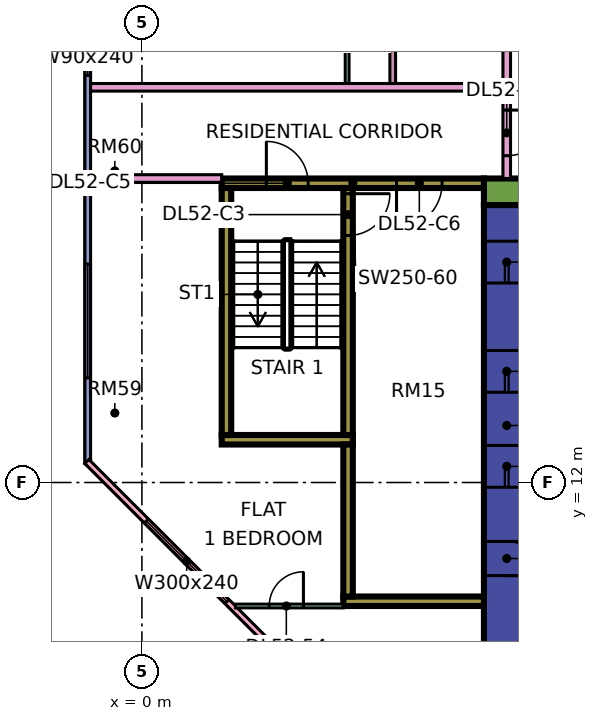
"""IFC4 building model, lengths in metres.
Left out: names, types, materials, properties, quantities, classifications, styles, units other than length and angle.
Written with IfcOpenShell. Run it as: python <this file> out.ifc"""

import sys

from ifc_helpers import new_model, si_unit, direction, frame, frame_2d, origin, place, context, subcontext, project, spatial, rectangle, extrude, element, fill, save


model = new_model("IFC4")
c1 = context("Model", 3, precision=1e-05, world=origin(), true_north=direction((0.0, 1.0)))
c2 = subcontext(c1, "Body", "Model", "MODEL_VIEW")
j1 = project(units=[si_unit("LENGTHUNIT", "METRE"), si_unit("PLANEANGLEUNIT", "RADIAN")], contexts=[c1])
p1 = place(None, origin())
s1 = spatial("IfcSite", under=j1, at=p1, CompositionType="ELEMENT")
p2 = place(p1, origin())
s2 = spatial("IfcBuilding", under=s1, at=p2, CompositionType="ELEMENT")
p3 = place(p2, frame((0.0, 0.0, 222.9)))
s3 = spatial("IfcBuildingStorey", under=s2, at=p3, CompositionType="ELEMENT", Elevation=222.9)
p4 = place(p3, frame((9.0, 19.65, 0.0), z_axis=(0.0, 0.0, 1.0), x_axis=(1.0, 0.0, 0.0)))
e1 = element("IfcWall", 1, at=p4, inside=s3, PredefinedType="SHEAR", context=c2, shape_type="SweptSolid", body=[
    extrude(rectangle(XDim=25.0, YDim=0.7, at=frame_2d((12.5, 0.0))), origin(), (0.0, 0.0, 1.0), 3.75),
])
p5 = place(p4, frame((19.1, 0.0, 0.0)))
e2 = element("IfcOpeningElement", 2, at=p5, cuts=e1, PredefinedType="OPENING", context=c2, shape_type="SweptSolid", body=[
    extrude(rectangle(XDim=1.8, YDim=2.4, at=frame_2d((0.9, 1.2))), frame((0.0, 0.36, 0.0), z_axis=(0.0, -1.0, 0.0), x_axis=(1.0, 0.0, 0.0)), (0.0, 0.0, 1.0), 0.72),
])
p6 = place(p3, frame((9.6, 7.7, 0.0), z_axis=(0.0, 0.0, 1.0), x_axis=(0.0, 1.0, 0.0)))
e3 = element("IfcWall", 3, at=p6, inside=s3, PredefinedType="SHEAR", context=c2, shape_type="SweptSolid", body=[
    extrude(rectangle(XDim=11.6, YDim=1.2, at=frame_2d((5.8, 0.0))), origin(), (0.0, 0.0, 1.0), 3.75),
])
p7 = place(p6, frame((4.175, 0.0, 0.0)))
e4 = element("IfcOpeningElement", 4, at=p7, cuts=e3, PredefinedType="OPENING", context=c2, shape_type="SweptSolid", body=[
    extrude(rectangle(XDim=1.1, YDim=2.2, at=frame_2d((0.55, 1.1))), frame((0.0, 0.61, 0.0), z_axis=(0.0, -1.0, 0.0), x_axis=(1.0, 0.0, 0.0)), (0.0, 0.0, 1.0), 1.22),
])
p8 = place(p6, frame((6.675, 0.0, 0.0)))
e5 = element("IfcOpeningElement", 5, at=p8, cuts=e3, PredefinedType="OPENING", context=c2, shape_type="SweptSolid", body=[
    extrude(rectangle(XDim=1.1, YDim=2.2, at=frame_2d((0.55, 1.1))), frame((0.0, 0.61, 0.0), z_axis=(0.0, -1.0, 0.0), x_axis=(1.0, 0.0, 0.0)), (0.0, 0.0, 1.0), 1.22),
])
p9 = place(p6, frame((9.55, 0.0, 0.0)))
e6 = element("IfcOpeningElement", 6, at=p9, cuts=e3, PredefinedType="OPENING", context=c2, shape_type="SweptSolid", body=[
    extrude(rectangle(XDim=1.1, YDim=2.2, at=frame_2d((0.55, 1.1))), frame((0.0, 0.61, 0.0), z_axis=(0.0, -1.0, 0.0), x_axis=(1.0, 0.0, 0.0)), (0.0, 0.0, 1.0), 1.22),
])
p10 = place(p6, frame((1.85, 0.0, 0.0)))
e7 = element("IfcOpeningElement", 7, at=p10, cuts=e3, PredefinedType="OPENING", context=c2, shape_type="SweptSolid", body=[
    extrude(rectangle(XDim=0.9, YDim=2.1, at=frame_2d((0.45, 1.05))), frame((0.0, 0.61, 0.0), z_axis=(0.0, -1.0, 0.0), x_axis=(1.0, 0.0, 0.0)), (0.0, 0.0, 1.0), 1.22),
])
p11 = place(p3, frame((2.1, 19.875, 0.0), z_axis=(0.0, 0.0, 1.0), x_axis=(1.0, 0.0, 0.0)))
e8 = element("IfcWall", 8, at=p11, inside=s3, PredefinedType="SHEAR", context=c2, shape_type="SweptSolid", body=[
    extrude(rectangle(XDim=6.9, YDim=0.25, at=frame_2d((3.45, 0.0))), origin(), (0.0, 0.0, 1.0), 3.75),
])
p12 = place(p11, frame((1.175, 0.0, 0.0)))
e9 = element("IfcOpeningElement", 9, at=p12, cuts=e8, PredefinedType="OPENING", context=c2, shape_type="SweptSolid", body=[
    extrude(rectangle(XDim=1.1, YDim=2.2, at=frame_2d((0.55, 1.1))), frame((0.0, 0.135, 0.0), z_axis=(0.0, -1.0, 0.0), x_axis=(1.0, 0.0, 0.0)), (0.0, 0.0, 1.0), 0.27),
])
p13 = place(p11, frame((4.6, 0.0, 0.0)))
e10 = element("IfcOpeningElement", 10, at=p13, cuts=e8, PredefinedType="OPENING", context=c2, shape_type="SweptSolid", body=[
    extrude(rectangle(XDim=1.2, YDim=2.2, at=frame_2d((0.6, 1.1))), frame((0.0, 0.135, 0.0), z_axis=(0.0, -1.0, 0.0), x_axis=(1.0, 0.0, 0.0)), (0.0, 0.0, 1.0), 0.27),
])
p14 = place(p3, frame((2.1, 13.125, 0.0), z_axis=(0.0, 0.0, 1.0), x_axis=(1.0, 0.0, 0.0)))
e11 = element("IfcWall", 11, at=p14, inside=s3, PredefinedType="SHEAR", context=c2, shape_type="SweptSolid", body=[
    extrude(rectangle(XDim=3.45, YDim=0.25, at=frame_2d((1.725, 0.0))), origin(), (0.0, 0.0, 1.0), 3.75),
])
p15 = place(p3, frame((2.225, 13.25, 0.0), z_axis=(0.0, 0.0, 1.0), x_axis=(0.0, 1.0, 0.0)))
e12 = element("IfcWall", 12, at=p15, inside=s3, PredefinedType="SHEAR", context=c2, shape_type="SweptSolid", body=[
    extrude(rectangle(XDim=6.5, YDim=0.25, at=frame_2d((3.25, 0.0))), origin(), (0.0, 0.0, 1.0), 3.75),
])
p16 = place(p3, frame((5.425, 13.25, 0.0), z_axis=(0.0, 0.0, 1.0), x_axis=(0.0, 1.0, 0.0)))
e13 = element("IfcWall", 13, at=p16, inside=s3, PredefinedType="SHEAR", context=c2, shape_type="SweptSolid", body=[
    extrude(rectangle(XDim=6.5, YDim=0.25, at=frame_2d((3.25, 0.0))), origin(), (0.0, 0.0, 1.0), 3.75),
])
p17 = place(p16, frame((5.25, 0.0, 0.0)))
e14 = element("IfcOpeningElement", 14, at=p17, cuts=e13, PredefinedType="OPENING", context=c2, shape_type="SweptSolid", body=[
    extrude(rectangle(XDim=1.1, YDim=2.2, at=frame_2d((0.55, 1.1))), frame((0.0, 0.135, 0.0), z_axis=(0.0, -1.0, 0.0), x_axis=(1.0, 0.0, 0.0)), (0.0, 0.0, 1.0), 0.27),
])
p18 = place(p3, frame((5.3, 8.875, 0.0), z_axis=(0.0, 0.0, 1.0), x_axis=(1.0, 0.0, 0.0)))
e15 = element("IfcWall", 15, at=p18, inside=s3, PredefinedType="SHEAR", context=c2, shape_type="SweptSolid", body=[
    extrude(rectangle(XDim=3.7, YDim=0.25, at=frame_2d((1.85, 0.0))), origin(), (0.0, 0.0, 1.0), 3.75),
])
p19 = place(p3, frame((5.425, 9.0, 0.0), z_axis=(0.0, 0.0, 1.0), x_axis=(0.0, 1.0, 0.0)))
e16 = element("IfcWall", 16, at=p19, inside=s3, PredefinedType="SHEAR", context=c2, shape_type="SweptSolid", body=[
    extrude(rectangle(XDim=4.0, YDim=0.25, at=frame_2d((2.0, 0.0))), origin(), (0.0, 0.0, 1.0), 3.75),
])
p20 = place(p3, frame((-1.425, 23.925, 0.0), z_axis=(0.0, 0.0, 1.0), x_axis=(0.0, -1.0, 0.0)))
e17 = element("IfcWall", 17, at=p20, inside=s3, PredefinedType="SOLIDWALL", context=c2, shape_type="SweptSolid", body=[
    extrude(rectangle(XDim=11.425, YDim=0.15, at=frame_2d((5.712, 0.0))), origin(), (0.0, 0.0, 1.0), 3.35),
])
p21 = place(p20, frame((0.312, 0.0, 0.45)))
e18 = element("IfcOpeningElement", 18, at=p21, cuts=e17, PredefinedType="OPENING", context=c2, shape_type="SweptSolid", body=[
    extrude(rectangle(XDim=0.9, YDim=2.4, at=frame_2d((0.45, 1.2))), frame((0.0, 0.085, 0.0), z_axis=(0.0, -1.0, 0.0), x_axis=(1.0, 0.0, 0.0)), (0.0, 0.0, 1.0), 0.17),
])
p22 = place(p20, frame((6.175, 0.0, 0.45)))
e19 = element("IfcOpeningElement", 19, at=p22, cuts=e17, PredefinedType="OPENING", context=c2, shape_type="SweptSolid", body=[
    extrude(rectangle(XDim=3.0, YDim=2.4, at=frame_2d((1.5, 1.2))), frame((0.0, 0.085, 0.0), z_axis=(0.0, -1.0, 0.0), x_axis=(1.0, 0.0, 0.0)), (0.0, 0.0, 1.0), 0.17),
])
p23 = place(p3, frame((-1.447, 12.553, 0.0), z_axis=(0.0, 0.0, 1.0), x_axis=(0.707106781187, -0.707106781187, 0.0)))
e20 = element("IfcWall", 20, at=p23, inside=s3, PredefinedType="SOLIDWALL", context=c2, shape_type="SweptSolid", body=[
    extrude(rectangle(XDim=19.799, YDim=0.15, at=frame_2d((9.899, 0.0))), origin(), (0.0, 0.0, 1.0), 3.35),
])
p24 = place(p23, frame((2.212, 0.0, 0.45)))
e21 = element("IfcOpeningElement", 21, at=p24, cuts=e20, PredefinedType="OPENING", context=c2, shape_type="SweptSolid", body=[
    extrude(rectangle(XDim=3.0, YDim=2.4, at=frame_2d((1.5, 1.2))), frame((0.0, 0.085, 0.0), z_axis=(0.0, -1.0, 0.0), x_axis=(1.0, 0.0, 0.0)), (0.0, 0.0, 1.0), 0.17),
])
p25 = place(p23, frame((10.216, 0.0, 0.45)))
e22 = element("IfcOpeningElement", 22, at=p25, cuts=e20, PredefinedType="OPENING", context=c2, shape_type="SweptSolid", body=[
    extrude(rectangle(XDim=3.0, YDim=2.4, at=frame_2d((1.5, 1.2))), frame((0.0, 0.085, 0.0), z_axis=(0.0, -1.0, 0.0), x_axis=(1.0, 0.0, 0.0)), (0.0, 0.0, 1.0), 0.17),
])
p26 = place(p3, frame((-1.35, 20.0, 0.0), z_axis=(0.0, 0.0, 1.0), x_axis=(1.0, 0.0, 0.0)))
e23 = element("IfcWall", 23, at=p26, inside=s3, PredefinedType="PARTITIONING", context=c2, shape_type="SweptSolid", body=[
    extrude(rectangle(XDim=3.45, YDim=0.2, at=frame_2d((1.725, 0.0))), origin(), (0.0, 0.0, 1.0), 3.35),
])
p27 = place(p3, frame((-1.35, 22.4, 0.0), z_axis=(0.0, 0.0, 1.0), x_axis=(1.0, 0.0, 0.0)))
e24 = element("IfcWall", 24, at=p27, inside=s3, PredefinedType="PARTITIONING", context=c2, shape_type="SweptSolid", body=[
    extrude(rectangle(XDim=10.85, YDim=0.2, at=frame_2d((5.425, 0.0))), origin(), (0.0, 0.0, 1.0), 3.35),
])
p28 = place(p3, frame((2.461, 8.75, 0.0), z_axis=(0.0, 0.0, 1.0), x_axis=(1.0, 0.0, 0.0)))
e25 = element("IfcWall", 25, at=p28, inside=s3, PredefinedType="PARTITIONING", context=c2, shape_type="SweptSolid", body=[
    extrude(rectangle(XDim=2.839, YDim=0.1, at=frame_2d((1.419, 0.0))), origin(), (0.0, 0.0, 1.0), 3.35),
])
p29 = place(p28, frame((0.889, 0.0, 0.0)))
e26 = element("IfcOpeningElement", 26, at=p29, cuts=e25, PredefinedType="OPENING", context=c2, shape_type="SweptSolid", body=[
    extrude(rectangle(XDim=0.9, YDim=2.1, at=frame_2d((0.45, 1.05))), frame((0.0, 0.06, 0.0), z_axis=(0.0, -1.0, 0.0), x_axis=(1.0, 0.0, 0.0)), (0.0, 0.0, 1.0), 0.12),
])
p30 = place(p3, frame((5.4, 22.5, 0.0), z_axis=(0.0, 0.0, 1.0), x_axis=(0.0, 1.0, 0.0)))
e27 = element("IfcWall", 27, at=p30, inside=s3, PredefinedType="PARTITIONING", context=c2, shape_type="SweptSolid", body=[
    extrude(rectangle(XDim=7.55, YDim=0.1, at=frame_2d((3.775, 0.0))), origin(), (0.0, 0.0, 1.0), 3.35),
])
p31 = place(p30, frame((1.8, 0.0, 0.0)))
e28 = element("IfcOpeningElement", 28, at=p31, cuts=e27, PredefinedType="OPENING", context=c2, shape_type="SweptSolid", body=[
    extrude(rectangle(XDim=0.9, YDim=2.1, at=frame_2d((0.45, 1.05))), frame((0.0, 0.06, 0.0), z_axis=(0.0, -1.0, 0.0), x_axis=(1.0, 0.0, 0.0)), (0.0, 0.0, 1.0), 0.12),
])
p32 = place(p30, frame((5.55, 0.0, 0.0)))
e29 = element("IfcOpeningElement", 29, at=p32, cuts=e27, PredefinedType="OPENING", context=c2, shape_type="SweptSolid", body=[
    extrude(rectangle(XDim=0.9, YDim=2.1, at=frame_2d((0.45, 1.05))), frame((0.0, 0.06, 0.0), z_axis=(0.0, -1.0, 0.0), x_axis=(1.0, 0.0, 0.0)), (0.0, 0.0, 1.0), 0.12),
])
p33 = place(p3, frame((6.6, 22.5, 0.0), z_axis=(0.0, 0.0, 1.0), x_axis=(0.0, 1.0, 0.0)))
e30 = element("IfcWall", 30, at=p33, inside=s3, PredefinedType="PARTITIONING", context=c2, shape_type="SweptSolid", body=[
    extrude(rectangle(XDim=10.875, YDim=0.15, at=frame_2d((5.438, 0.0))), origin(), (0.0, 0.0, 1.0), 3.35),
])
p34 = place(p33, frame((8.4, 0.0, 0.0)))
e31 = element("IfcOpeningElement", 31, at=p34, cuts=e30, PredefinedType="OPENING", context=c2, shape_type="SweptSolid", body=[
    extrude(rectangle(XDim=0.8, YDim=2.1, at=frame_2d((0.4, 1.05))), frame((0.0, 0.085, 0.0), z_axis=(0.0, -1.0, 0.0), x_axis=(1.0, 0.0, 0.0)), (0.0, 0.0, 1.0), 0.17),
])
p35 = place(p33, frame((2.9, 0.0, 0.0)))
e32 = element("IfcOpeningElement", 32, at=p35, cuts=e30, PredefinedType="OPENING", context=c2, shape_type="SweptSolid", body=[
    extrude(rectangle(XDim=0.9, YDim=2.1, at=frame_2d((0.45, 1.05))), frame((0.0, 0.085, 0.0), z_axis=(0.0, -1.0, 0.0), x_axis=(1.0, 0.0, 0.0)), (0.0, 0.0, 1.0), 0.17),
])
p36 = place(p3, frame((9.6, 20.0, 0.0), z_axis=(0.0, 0.0, 1.0), x_axis=(0.0, 1.0, 0.0)))
e33 = element("IfcWall", 33, at=p36, inside=s3, PredefinedType="PARTITIONING", context=c2, shape_type="SweptSolid", body=[
    extrude(rectangle(XDim=42.926, YDim=0.2, at=frame_2d((21.463, 0.0))), origin(), (0.0, 0.0, 1.0), 3.35),
])
p37 = place(p36, frame((17.1, 0.0, 0.0)))
e34 = element("IfcOpeningElement", 34, at=p37, cuts=e33, PredefinedType="OPENING", context=c2, shape_type="SweptSolid", body=[
    extrude(rectangle(XDim=1.0, YDim=2.1, at=frame_2d((0.5, 1.05))), frame((0.0, 0.11, 0.0), z_axis=(0.0, -1.0, 0.0), x_axis=(1.0, 0.0, 0.0)), (0.0, 0.0, 1.0), 0.22),
])
p38 = place(p36, frame((32.1, 0.0, 0.0)))
e35 = element("IfcOpeningElement", 35, at=p38, cuts=e33, PredefinedType="OPENING", context=c2, shape_type="SweptSolid", body=[
    extrude(rectangle(XDim=1.0, YDim=2.1, at=frame_2d((0.5, 1.05))), frame((0.0, 0.11, 0.0), z_axis=(0.0, -1.0, 0.0), x_axis=(1.0, 0.0, 0.0)), (0.0, 0.0, 1.0), 0.22),
])
p39 = place(p36, frame((0.6, 0.0, 0.0)))
e36 = element("IfcOpeningElement", 36, at=p39, cuts=e33, PredefinedType="OPENING", context=c2, shape_type="SweptSolid", body=[
    extrude(rectangle(XDim=1.2, YDim=2.1, at=frame_2d((0.6, 1.05))), frame((0.0, 0.11, 0.0), z_axis=(0.0, -1.0, 0.0), x_axis=(1.0, 0.0, 0.0)), (0.0, 0.0, 1.0), 0.22),
])
p40 = place(p36, frame((14.1, 0.0, 0.0)))
e37 = element("IfcOpeningElement", 37, at=p40, cuts=e33, PredefinedType="OPENING", context=c2, shape_type="SweptSolid", body=[
    extrude(rectangle(XDim=1.0, YDim=2.1, at=frame_2d((0.5, 1.05))), frame((0.0, 0.11, 0.0), z_axis=(0.0, -1.0, 0.0), x_axis=(1.0, 0.0, 0.0)), (0.0, 0.0, 1.0), 0.22),
])
p41 = place(p21, origin())
e38 = element("IfcWindow", 38, at=p41, inside=s3, PartitioningType="SINGLE_PANEL", PredefinedType="WINDOW", context=c2, shape_type="SweptSolid", body=[
    extrude(rectangle(XDim=0.9, YDim=2.4, at=frame_2d((0.45, 1.2))), frame((0.0, 0.03, 0.0), z_axis=(0.0, -1.0, 0.0), x_axis=(1.0, 0.0, 0.0)), (0.0, 0.0, 1.0), 0.06),
])
fill(e18, e38)
p42 = place(p22, origin())
e39 = element("IfcWindow", 39, at=p42, inside=s3, PartitioningType="SINGLE_PANEL", PredefinedType="WINDOW", context=c2, shape_type="SweptSolid", body=[
    extrude(rectangle(XDim=3.0, YDim=2.4, at=frame_2d((1.5, 1.2))), frame((0.0, 0.03, 0.0), z_axis=(0.0, -1.0, 0.0), x_axis=(1.0, 0.0, 0.0)), (0.0, 0.0, 1.0), 0.06),
])
fill(e19, e39)
p43 = place(p24, origin())
e40 = element("IfcWindow", 40, at=p43, inside=s3, PartitioningType="SINGLE_PANEL", PredefinedType="WINDOW", context=c2, shape_type="SweptSolid", body=[
    extrude(rectangle(XDim=3.0, YDim=2.4, at=frame_2d((1.5, 1.2))), frame((0.0, 0.03, 0.0), z_axis=(0.0, -1.0, 0.0), x_axis=(1.0, 0.0, 0.0)), (0.0, 0.0, 1.0), 0.06),
])
fill(e21, e40)
p44 = place(p7, origin())
e41 = element("IfcDoor", 41, at=p44, inside=s3, OperationType="DOUBLE_DOOR_SLIDING", PredefinedType="DOOR", context=c2, shape_type="SweptSolid", body=[
    extrude(rectangle(XDim=1.1, YDim=2.2, at=frame_2d((0.55, 1.1))), frame((0.0, 0.025, 0.0), z_axis=(0.0, -1.0, 0.0), x_axis=(1.0, 0.0, 0.0)), (0.0, 0.0, 1.0), 0.05),
])
fill(e4, e41)
p45 = place(p8, origin())
e42 = element("IfcDoor", 42, at=p45, inside=s3, OperationType="DOUBLE_DOOR_SLIDING", PredefinedType="DOOR", context=c2, shape_type="SweptSolid", body=[
    extrude(rectangle(XDim=1.1, YDim=2.2, at=frame_2d((0.55, 1.1))), frame((0.0, 0.025, 0.0), z_axis=(0.0, -1.0, 0.0), x_axis=(1.0, 0.0, 0.0)), (0.0, 0.0, 1.0), 0.05),
])
fill(e5, e42)
p46 = place(p9, origin())
e43 = element("IfcDoor", 43, at=p46, inside=s3, OperationType="DOUBLE_DOOR_SLIDING", PredefinedType="DOOR", context=c2, shape_type="SweptSolid", body=[
    extrude(rectangle(XDim=1.1, YDim=2.2, at=frame_2d((0.55, 1.1))), frame((0.0, 0.025, 0.0), z_axis=(0.0, -1.0, 0.0), x_axis=(1.0, 0.0, 0.0)), (0.0, 0.0, 1.0), 0.05),
])
fill(e6, e43)
p47 = place(p17, origin())
e44 = element("IfcDoor", 44, at=p47, inside=s3, OperationType="SINGLE_SWING_RIGHT", PredefinedType="DOOR", context=c2, shape_type="SweptSolid", body=[
    extrude(rectangle(XDim=1.1, YDim=2.2, at=frame_2d((0.55, 1.1))), frame((0.0, 0.025, 0.0), z_axis=(0.0, -1.0, 0.0), x_axis=(1.0, 0.0, 0.0)), (0.0, 0.0, 1.0), 0.05),
])
fill(e14, e44)
p48 = place(p10, frame((0.9, 0.0, 0.0), z_axis=(0.0, 0.0, 1.0), x_axis=(-1.0, 0.0, 0.0)))
e45 = element("IfcDoor", 45, at=p48, inside=s3, OperationType="SINGLE_SWING_LEFT", PredefinedType="DOOR", context=c2, shape_type="SweptSolid", body=[
    extrude(rectangle(XDim=0.9, YDim=2.1, at=frame_2d((0.45, 1.05))), frame((0.0, 0.025, 0.0), z_axis=(0.0, -1.0, 0.0), x_axis=(1.0, 0.0, 0.0)), (0.0, 0.0, 1.0), 0.05),
])
fill(e7, e45)
p49 = place(p12, origin())
e46 = element("IfcDoor", 46, at=p49, inside=s3, OperationType="SINGLE_SWING_LEFT", PredefinedType="DOOR", context=c2, shape_type="SweptSolid", body=[
    extrude(rectangle(XDim=1.1, YDim=2.2, at=frame_2d((0.55, 1.1))), frame((0.0, 0.025, 0.0), z_axis=(0.0, -1.0, 0.0), x_axis=(1.0, 0.0, 0.0)), (0.0, 0.0, 1.0), 0.05),
])
fill(e9, e46)
p50 = place(p13, frame((1.2, 0.0, 0.0), z_axis=(0.0, 0.0, 1.0), x_axis=(-1.0, 0.0, 0.0)))
e47 = element("IfcDoor", 47, at=p50, inside=s3, OperationType="SINGLE_SWING_LEFT", PredefinedType="DOOR", context=c2, shape_type="SweptSolid", body=[
    extrude(rectangle(XDim=1.2, YDim=2.2, at=frame_2d((0.6, 1.1))), frame((0.0, 0.025, 0.0), z_axis=(0.0, -1.0, 0.0), x_axis=(1.0, 0.0, 0.0)), (0.0, 0.0, 1.0), 0.05),
])
fill(e10, e47)
p51 = place(p39, origin())
e48 = element("IfcDoor", 48, at=p51, inside=s3, OperationType="SINGLE_SWING_RIGHT", PredefinedType="DOOR", context=c2, shape_type="SweptSolid", body=[
    extrude(rectangle(XDim=1.2, YDim=2.1, at=frame_2d((0.6, 1.05))), frame((0.0, 0.025, 0.0), z_axis=(0.0, -1.0, 0.0), x_axis=(1.0, 0.0, 0.0)), (0.0, 0.0, 1.0), 0.05),
])
fill(e36, e48)
p52 = place(p29, frame((0.9, 0.0, 0.0), z_axis=(0.0, 0.0, 1.0), x_axis=(-1.0, 0.0, 0.0)))
e49 = element("IfcDoor", 49, at=p52, inside=s3, OperationType="SINGLE_SWING_RIGHT", PredefinedType="DOOR", context=c2, shape_type="SweptSolid", body=[
    extrude(rectangle(XDim=0.9, YDim=2.1, at=frame_2d((0.45, 1.05))), frame((0.0, 0.025, 0.0), z_axis=(0.0, -1.0, 0.0), x_axis=(1.0, 0.0, 0.0)), (0.0, 0.0, 1.0), 0.05),
])
fill(e26, e49)
save(model, sys.argv[1])
